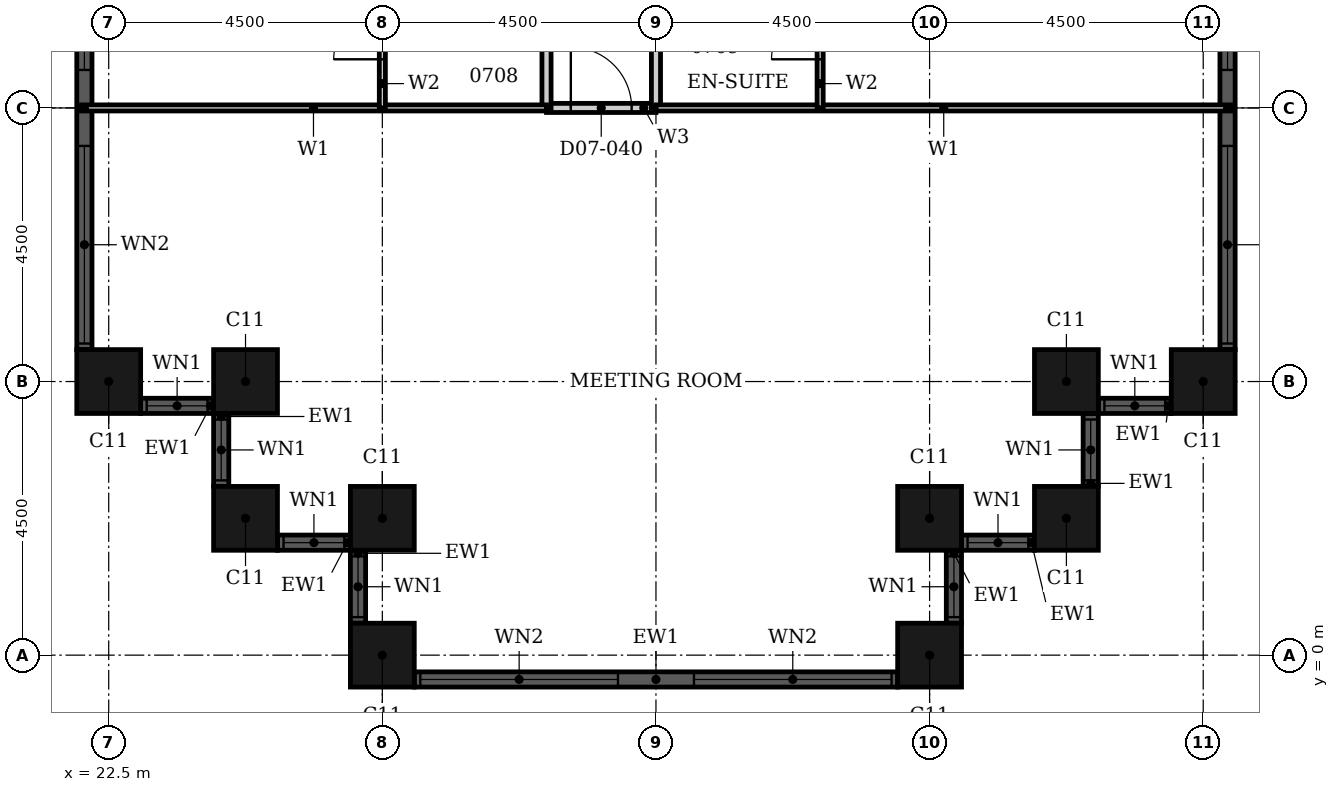
"""IFC4 building model, lengths in metres.
Left out: names, types, materials, properties, quantities, classifications, styles, units other than length and angle.
Written with IfcOpenShell. Run it as: python <this file> out.ifc"""

import sys

from ifc_helpers import new_model, si_unit, direction, frame, frame_2d, origin, origin_2d, place, context, subcontext, project, spatial, rectangle, hollow_rectangle, extrude, element, fill, save


model = new_model("IFC4")
c1 = context("Model", 3, precision=1e-05, world=origin(), true_north=direction((0.0, 1.0)))
c2 = subcontext(c1, "Body", "Model", "MODEL_VIEW")
j1 = project(units=[si_unit("LENGTHUNIT", "METRE"), si_unit("PLANEANGLEUNIT", "RADIAN")], contexts=[c1])
p1 = place(None, origin())
s1 = spatial("IfcSite", under=j1, at=p1, CompositionType="ELEMENT")
p2 = place(p1, origin())
s2 = spatial("IfcBuilding", under=s1, at=p2, CompositionType="ELEMENT")
p3 = place(p2, frame((0.0, 0.0, 37.2)))
s3 = spatial("IfcBuildingStorey", under=s2, at=p3, CompositionType="ELEMENT", Elevation=37.2)
for number, where, z_axis, x_axis in (
    (1, (22.5, 4.5, 0.0), (0.0, 0.0, 1.0), (1.0, 0.0, 0.0)),
    (2, (24.75, 4.5, 0.0), (0.0, 0.0, 1.0), (1.0, 0.0, 0.0)),
    (3, (24.75, 2.25, 0.0), (0.0, 0.0, 1.0), (1.0, 0.0, 0.0)),
    (4, (27.0, 2.25, 0.0), (0.0, 0.0, 1.0), (1.0, 0.0, 0.0)),
    (5, (27.0, 0.0, 0.0), (0.0, 0.0, 1.0), (1.0, 0.0, 0.0)),
    (6, (36.0, 0.0, 0.0), (0.0, 0.0, 1.0), (1.0, 0.0, 0.0)),
    (7, (36.0, 2.25, 0.0), (0.0, 0.0, 1.0), (1.0, 0.0, 0.0)),
    (8, (38.25, 2.25, 0.0), (0.0, 0.0, 1.0), (1.0, 0.0, 0.0)),
    (9, (38.25, 4.5, 0.0), (0.0, 0.0, 1.0), (1.0, 0.0, 0.0)),
    (10, (40.5, 4.5, 0.0), (0.0, 0.0, 1.0), (1.0, 0.0, 0.0)),
):
    element("IfcColumn", number, at=place(p3, frame(where, z_axis=z_axis, x_axis=x_axis)), inside=s3, PredefinedType="COLUMN", context=c2, shape_type="SweptSolid", body=[
        extrude(hollow_rectangle(XDim=1.05, YDim=1.05, WallThickness=0.034, at=origin_2d()), origin(), (0.0, 0.0, 1.0), 3.6),
    ])
p4 = place(p3, frame((23.025, 4.1, 0.0), z_axis=(0.0, 0.0, 1.0), x_axis=(1.0, 0.0, 0.0)))
e11 = element("IfcWall", 11, at=p4, inside=s3, PredefinedType="SOLIDWALL", context=c2, shape_type="SweptSolid", body=[
    extrude(rectangle(XDim=1.2, YDim=0.25, at=frame_2d((0.6, 0.0))), origin(), (0.0, 0.0, 1.0), 3.6),
])
p5 = place(p4, frame((0.1, 0.0, 0.9)))
e12 = element("IfcOpeningElement", 12, at=p5, cuts=e11, PredefinedType="OPENING", context=c2, shape_type="SweptSolid", body=[
    extrude(rectangle(XDim=1.0, YDim=2.08, at=frame_2d((0.5, 1.04))), frame((0.0, 0.135, 0.0), z_axis=(0.0, -1.0, 0.0), x_axis=(1.0, 0.0, 0.0)), (0.0, 0.0, 1.0), 0.27),
])
p6 = place(p3, frame((24.35, 3.975, 0.0), z_axis=(0.0, 0.0, 1.0), x_axis=(0.0, -1.0, 0.0)))
e13 = element("IfcWall", 13, at=p6, inside=s3, PredefinedType="SOLIDWALL", context=c2, shape_type="SweptSolid", body=[
    extrude(rectangle(XDim=1.2, YDim=0.25, at=frame_2d((0.6, 0.0))), origin(), (0.0, 0.0, 1.0), 3.6),
])
p7 = place(p6, frame((0.1, 0.0, 0.9)))
e14 = element("IfcOpeningElement", 14, at=p7, cuts=e13, PredefinedType="OPENING", context=c2, shape_type="SweptSolid", body=[
    extrude(rectangle(XDim=1.0, YDim=2.08, at=frame_2d((0.5, 1.04))), frame((0.0, 0.135, 0.0), z_axis=(0.0, -1.0, 0.0), x_axis=(1.0, 0.0, 0.0)), (0.0, 0.0, 1.0), 0.27),
])
p8 = place(p3, frame((25.275, 1.85, 0.0), z_axis=(0.0, 0.0, 1.0), x_axis=(1.0, 0.0, 0.0)))
e15 = element("IfcWall", 15, at=p8, inside=s3, PredefinedType="SOLIDWALL", context=c2, shape_type="SweptSolid", body=[
    extrude(rectangle(XDim=1.2, YDim=0.25, at=frame_2d((0.6, 0.0))), origin(), (0.0, 0.0, 1.0), 3.6),
])
p9 = place(p8, frame((0.1, 0.0, 0.9)))
e16 = element("IfcOpeningElement", 16, at=p9, cuts=e15, PredefinedType="OPENING", context=c2, shape_type="SweptSolid", body=[
    extrude(rectangle(XDim=1.0, YDim=2.08, at=frame_2d((0.5, 1.04))), frame((0.0, 0.135, 0.0), z_axis=(0.0, -1.0, 0.0), x_axis=(1.0, 0.0, 0.0)), (0.0, 0.0, 1.0), 0.27),
])
p10 = place(p3, frame((26.6, 1.725, 0.0), z_axis=(0.0, 0.0, 1.0), x_axis=(0.0, -1.0, 0.0)))
e17 = element("IfcWall", 17, at=p10, inside=s3, PredefinedType="SOLIDWALL", context=c2, shape_type="SweptSolid", body=[
    extrude(rectangle(XDim=1.2, YDim=0.25, at=frame_2d((0.6, 0.0))), origin(), (0.0, 0.0, 1.0), 3.6),
])
p11 = place(p10, frame((0.1, 0.0, 0.9)))
e18 = element("IfcOpeningElement", 18, at=p11, cuts=e17, PredefinedType="OPENING", context=c2, shape_type="SweptSolid", body=[
    extrude(rectangle(XDim=1.0, YDim=2.08, at=frame_2d((0.5, 1.04))), frame((0.0, 0.135, 0.0), z_axis=(0.0, -1.0, 0.0), x_axis=(1.0, 0.0, 0.0)), (0.0, 0.0, 1.0), 0.27),
])
p12 = place(p3, frame((27.525, -0.4, 0.0), z_axis=(0.0, 0.0, 1.0), x_axis=(1.0, 0.0, 0.0)))
e19 = element("IfcWall", 19, at=p12, inside=s3, PredefinedType="SOLIDWALL", context=c2, shape_type="SweptSolid", body=[
    extrude(rectangle(XDim=7.95, YDim=0.25, at=frame_2d((3.975, 0.0))), origin(), (0.0, 0.0, 1.0), 3.6),
])
p13 = place(p12, frame((0.1, 0.0, 0.9)))
e20 = element("IfcOpeningElement", 20, at=p13, cuts=e19, PredefinedType="OPENING", context=c2, shape_type="SweptSolid", body=[
    extrude(rectangle(XDim=3.25, YDim=2.08, at=frame_2d((1.625, 1.04))), frame((0.0, 0.135, 0.0), z_axis=(0.0, -1.0, 0.0), x_axis=(1.0, 0.0, 0.0)), (0.0, 0.0, 1.0), 0.27),
])
p14 = place(p12, frame((4.6, 0.0, 0.9)))
e21 = element("IfcOpeningElement", 21, at=p14, cuts=e19, PredefinedType="OPENING", context=c2, shape_type="SweptSolid", body=[
    extrude(rectangle(XDim=3.25, YDim=2.08, at=frame_2d((1.625, 1.04))), frame((0.0, 0.135, 0.0), z_axis=(0.0, -1.0, 0.0), x_axis=(1.0, 0.0, 0.0)), (0.0, 0.0, 1.0), 0.27),
])
p15 = place(p3, frame((36.4, 0.525, 0.0), z_axis=(0.0, 0.0, 1.0), x_axis=(0.0, 1.0, 0.0)))
e22 = element("IfcWall", 22, at=p15, inside=s3, PredefinedType="SOLIDWALL", context=c2, shape_type="SweptSolid", body=[
    extrude(rectangle(XDim=1.2, YDim=0.25, at=frame_2d((0.6, 0.0))), origin(), (0.0, 0.0, 1.0), 3.6),
])
p16 = place(p15, frame((0.1, 0.0, 0.9)))
e23 = element("IfcOpeningElement", 23, at=p16, cuts=e22, PredefinedType="OPENING", context=c2, shape_type="SweptSolid", body=[
    extrude(rectangle(XDim=1.0, YDim=2.08, at=frame_2d((0.5, 1.04))), frame((0.0, 0.135, 0.0), z_axis=(0.0, -1.0, 0.0), x_axis=(1.0, 0.0, 0.0)), (0.0, 0.0, 1.0), 0.27),
])
p17 = place(p3, frame((36.525, 1.85, 0.0), z_axis=(0.0, 0.0, 1.0), x_axis=(1.0, 0.0, 0.0)))
e24 = element("IfcWall", 24, at=p17, inside=s3, PredefinedType="SOLIDWALL", context=c2, shape_type="SweptSolid", body=[
    extrude(rectangle(XDim=1.2, YDim=0.25, at=frame_2d((0.6, 0.0))), origin(), (0.0, 0.0, 1.0), 3.6),
])
p18 = place(p17, frame((0.1, 0.0, 0.9)))
e25 = element("IfcOpeningElement", 25, at=p18, cuts=e24, PredefinedType="OPENING", context=c2, shape_type="SweptSolid", body=[
    extrude(rectangle(XDim=1.0, YDim=2.08, at=frame_2d((0.5, 1.04))), frame((0.0, 0.135, 0.0), z_axis=(0.0, -1.0, 0.0), x_axis=(1.0, 0.0, 0.0)), (0.0, 0.0, 1.0), 0.27),
])
p19 = place(p3, frame((38.65, 2.775, 0.0), z_axis=(0.0, 0.0, 1.0), x_axis=(0.0, 1.0, 0.0)))
e26 = element("IfcWall", 26, at=p19, inside=s3, PredefinedType="SOLIDWALL", context=c2, shape_type="SweptSolid", body=[
    extrude(rectangle(XDim=1.2, YDim=0.25, at=frame_2d((0.6, 0.0))), origin(), (0.0, 0.0, 1.0), 3.6),
])
p20 = place(p19, frame((0.1, 0.0, 0.9)))
e27 = element("IfcOpeningElement", 27, at=p20, cuts=e26, PredefinedType="OPENING", context=c2, shape_type="SweptSolid", body=[
    extrude(rectangle(XDim=1.0, YDim=2.08, at=frame_2d((0.5, 1.04))), frame((0.0, 0.135, 0.0), z_axis=(0.0, -1.0, 0.0), x_axis=(1.0, 0.0, 0.0)), (0.0, 0.0, 1.0), 0.27),
])
p21 = place(p3, frame((38.775, 4.1, 0.0), z_axis=(0.0, 0.0, 1.0), x_axis=(1.0, 0.0, 0.0)))
e28 = element("IfcWall", 28, at=p21, inside=s3, PredefinedType="SOLIDWALL", context=c2, shape_type="SweptSolid", body=[
    extrude(rectangle(XDim=1.2, YDim=0.25, at=frame_2d((0.6, 0.0))), origin(), (0.0, 0.0, 1.0), 3.6),
])
p22 = place(p21, frame((0.1, 0.0, 0.9)))
e29 = element("IfcOpeningElement", 29, at=p22, cuts=e28, PredefinedType="OPENING", context=c2, shape_type="SweptSolid", body=[
    extrude(rectangle(XDim=1.0, YDim=2.08, at=frame_2d((0.5, 1.04))), frame((0.0, 0.135, 0.0), z_axis=(0.0, -1.0, 0.0), x_axis=(1.0, 0.0, 0.0)), (0.0, 0.0, 1.0), 0.27),
])
p23 = place(p3, frame((40.9, 5.025, 0.0), z_axis=(0.0, 0.0, 1.0), x_axis=(0.0, 1.0, 0.0)))
e30 = element("IfcWall", 30, at=p23, inside=s3, PredefinedType="SOLIDWALL", context=c2, shape_type="SweptSolid", body=[
    extrude(rectangle(XDim=7.95, YDim=0.25, at=frame_2d((3.975, 0.0))), origin(), (0.0, 0.0, 1.0), 3.6),
])
p24 = place(p23, frame((0.1, 0.0, 0.9)))
e31 = element("IfcOpeningElement", 31, at=p24, cuts=e30, PredefinedType="OPENING", context=c2, shape_type="SweptSolid", body=[
    extrude(rectangle(XDim=3.25, YDim=2.08, at=frame_2d((1.625, 1.04))), frame((0.0, 0.135, 0.0), z_axis=(0.0, -1.0, 0.0), x_axis=(1.0, 0.0, 0.0)), (0.0, 0.0, 1.0), 0.27),
])
p25 = place(p23, frame((4.6, 0.0, 0.9)))
e32 = element("IfcOpeningElement", 32, at=p25, cuts=e30, PredefinedType="OPENING", context=c2, shape_type="SweptSolid", body=[
    extrude(rectangle(XDim=3.25, YDim=2.08, at=frame_2d((1.625, 1.04))), frame((0.0, 0.135, 0.0), z_axis=(0.0, -1.0, 0.0), x_axis=(1.0, 0.0, 0.0)), (0.0, 0.0, 1.0), 0.27),
])
p26 = place(p3, frame((22.1, 12.975, 0.0), z_axis=(0.0, 0.0, 1.0), x_axis=(0.0, -1.0, 0.0)))
e33 = element("IfcWall", 33, at=p26, inside=s3, PredefinedType="SOLIDWALL", context=c2, shape_type="SweptSolid", body=[
    extrude(rectangle(XDim=7.95, YDim=0.25, at=frame_2d((3.975, 0.0))), origin(), (0.0, 0.0, 1.0), 3.6),
])
p27 = place(p26, frame((0.1, 0.0, 0.9)))
e34 = element("IfcOpeningElement", 34, at=p27, cuts=e33, PredefinedType="OPENING", context=c2, shape_type="SweptSolid", body=[
    extrude(rectangle(XDim=3.25, YDim=2.08, at=frame_2d((1.625, 1.04))), frame((0.0, 0.135, 0.0), z_axis=(0.0, -1.0, 0.0), x_axis=(1.0, 0.0, 0.0)), (0.0, 0.0, 1.0), 0.27),
])
p28 = place(p26, frame((4.6, 0.0, 0.9)))
e35 = element("IfcOpeningElement", 35, at=p28, cuts=e33, PredefinedType="OPENING", context=c2, shape_type="SweptSolid", body=[
    extrude(rectangle(XDim=3.25, YDim=2.08, at=frame_2d((1.625, 1.04))), frame((0.0, 0.135, 0.0), z_axis=(0.0, -1.0, 0.0), x_axis=(1.0, 0.0, 0.0)), (0.0, 0.0, 1.0), 0.27),
])
p29 = place(p3, frame((29.7, 9.0, 0.0), z_axis=(0.0, 0.0, 1.0), x_axis=(1.0, 0.0, 0.0)))
e36 = element("IfcWall", 36, at=p29, inside=s3, PredefinedType="PARTITIONING", context=c2, shape_type="SweptSolid", body=[
    extrude(rectangle(XDim=1.8, YDim=0.15, at=frame_2d((0.9, 0.0))), origin(), (0.0, 0.0, 1.0), 3.3),
])
p30 = place(p29, frame((0.4, 0.0, 0.0)))
e37 = element("IfcOpeningElement", 37, at=p30, cuts=e36, PredefinedType="OPENING", context=c2, shape_type="SweptSolid", body=[
    extrude(rectangle(XDim=1.0, YDim=2.1, at=frame_2d((0.5, 1.05))), frame((0.0, 0.085, 0.0), z_axis=(0.0, -1.0, 0.0), x_axis=(1.0, 0.0, 0.0)), (0.0, 0.0, 1.0), 0.17),
])
p31 = place(p3, frame((29.7, 9.0, 0.0), z_axis=(0.0, 0.0, 1.0), x_axis=(0.0, 1.0, 0.0)))
e38 = element("IfcWall", 38, at=p31, inside=s3, PredefinedType="PARTITIONING", context=c2, shape_type="SweptSolid", body=[
    extrude(rectangle(XDim=4.5, YDim=0.15, at=frame_2d((2.25, 0.0))), origin(), (0.0, 0.0, 1.0), 3.3),
])
p32 = place(p31, frame((2.95, 0.0, 0.0)))
e39 = element("IfcOpeningElement", 39, at=p32, cuts=e38, PredefinedType="OPENING", context=c2, shape_type="SweptSolid", body=[
    extrude(rectangle(XDim=1.0, YDim=2.1, at=frame_2d((0.5, 1.05))), frame((0.0, 0.085, 0.0), z_axis=(0.0, -1.0, 0.0), x_axis=(1.0, 0.0, 0.0)), (0.0, 0.0, 1.0), 0.17),
])
p33 = place(p3, frame((31.5, 9.0, 0.0), z_axis=(0.0, 0.0, 1.0), x_axis=(0.0, 1.0, 0.0)))
e40 = element("IfcWall", 40, at=p33, inside=s3, PredefinedType="PARTITIONING", context=c2, shape_type="SweptSolid", body=[
    extrude(rectangle(XDim=11.7, YDim=0.15, at=frame_2d((5.85, 0.0))), origin(), (0.0, 0.0, 1.0), 2.58),
])
p34 = place(p33, frame((2.95, 0.0, 0.0)))
e41 = element("IfcOpeningElement", 41, at=p34, cuts=e40, PredefinedType="OPENING", context=c2, shape_type="SweptSolid", body=[
    extrude(rectangle(XDim=1.0, YDim=2.1, at=frame_2d((0.5, 1.05))), frame((0.0, 0.085, 0.0), z_axis=(0.0, -1.0, 0.0), x_axis=(1.0, 0.0, 0.0)), (0.0, 0.0, 1.0), 0.17),
])
p35 = place(p3, frame((31.5, 9.0, 0.0), z_axis=(0.0, 0.0, 1.0), x_axis=(1.0, 0.0, 0.0)))
e42 = element("IfcWall", 42, at=p35, inside=s3, PredefinedType="PARTITIONING", context=c2, shape_type="SweptSolid", body=[
    extrude(rectangle(XDim=9.465, YDim=0.1, at=frame_2d((4.732, 0.0))), origin(), (0.0, 0.0, 1.0), 3.3),
])
p36 = place(p3, frame((22.035, 9.0, 0.0), z_axis=(0.0, 0.0, 1.0), x_axis=(1.0, 0.0, 0.0)))
e43 = element("IfcWall", 43, at=p36, inside=s3, PredefinedType="PARTITIONING", context=c2, shape_type="SweptSolid", body=[
    extrude(rectangle(XDim=7.665, YDim=0.1, at=frame_2d((3.833, 0.0))), origin(), (0.0, 0.0, 1.0), 3.3),
])
p37 = place(p3, frame((27.0, 9.0, 0.0), z_axis=(0.0, 0.0, 1.0), x_axis=(0.0, 1.0, 0.0)))
e44 = element("IfcWall", 44, at=p37, inside=s3, PredefinedType="PARTITIONING", context=c2, shape_type="SweptSolid", body=[
    extrude(rectangle(XDim=2.4, YDim=0.1, at=frame_2d((1.2, 0.0))), origin(), (0.0, 0.0, 1.0), 2.58),
])
p38 = place(p37, frame((0.8, 0.0, 0.0)))
e45 = element("IfcOpeningElement", 45, at=p38, cuts=e44, PredefinedType="OPENING", context=c2, shape_type="SweptSolid", body=[
    extrude(rectangle(XDim=0.8, YDim=2.1, at=frame_2d((0.4, 1.05))), frame((0.0, 0.06, 0.0), z_axis=(0.0, -1.0, 0.0), x_axis=(1.0, 0.0, 0.0)), (0.0, 0.0, 1.0), 0.12),
])
p39 = place(p3, frame((34.2, 9.0, 0.0), z_axis=(0.0, 0.0, 1.0), x_axis=(0.0, 1.0, 0.0)))
e46 = element("IfcWall", 46, at=p39, inside=s3, PredefinedType="PARTITIONING", context=c2, shape_type="SweptSolid", body=[
    extrude(rectangle(XDim=2.4, YDim=0.1, at=frame_2d((1.2, 0.0))), origin(), (0.0, 0.0, 1.0), 3.3),
])
p40 = place(p39, frame((0.8, 0.0, 0.0)))
e47 = element("IfcOpeningElement", 47, at=p40, cuts=e46, PredefinedType="OPENING", context=c2, shape_type="SweptSolid", body=[
    extrude(rectangle(XDim=0.8, YDim=2.1, at=frame_2d((0.4, 1.05))), frame((0.0, 0.06, 0.0), z_axis=(0.0, -1.0, 0.0), x_axis=(1.0, 0.0, 0.0)), (0.0, 0.0, 1.0), 0.12),
])
p41 = place(p5, origin())
e48 = element("IfcWindow", 48, at=p41, inside=s3, PartitioningType="SINGLE_PANEL", PredefinedType="WINDOW", context=c2, shape_type="SweptSolid", body=[
    extrude(rectangle(XDim=1.0, YDim=2.08, at=frame_2d((0.5, 1.04))), frame((0.0, 0.03, 0.0), z_axis=(0.0, -1.0, 0.0), x_axis=(1.0, 0.0, 0.0)), (0.0, 0.0, 1.0), 0.06),
])
fill(e12, e48)
p42 = place(p7, origin())
e49 = element("IfcWindow", 49, at=p42, inside=s3, PartitioningType="SINGLE_PANEL", PredefinedType="WINDOW", context=c2, shape_type="SweptSolid", body=[
    extrude(rectangle(XDim=1.0, YDim=2.08, at=frame_2d((0.5, 1.04))), frame((0.0, 0.03, 0.0), z_axis=(0.0, -1.0, 0.0), x_axis=(1.0, 0.0, 0.0)), (0.0, 0.0, 1.0), 0.06),
])
fill(e14, e49)
p43 = place(p9, origin())
e50 = element("IfcWindow", 50, at=p43, inside=s3, PartitioningType="SINGLE_PANEL", PredefinedType="WINDOW", context=c2, shape_type="SweptSolid", body=[
    extrude(rectangle(XDim=1.0, YDim=2.08, at=frame_2d((0.5, 1.04))), frame((0.0, 0.03, 0.0), z_axis=(0.0, -1.0, 0.0), x_axis=(1.0, 0.0, 0.0)), (0.0, 0.0, 1.0), 0.06),
])
fill(e16, e50)
p44 = place(p11, origin())
e51 = element("IfcWindow", 51, at=p44, inside=s3, PartitioningType="SINGLE_PANEL", PredefinedType="WINDOW", context=c2, shape_type="SweptSolid", body=[
    extrude(rectangle(XDim=1.0, YDim=2.08, at=frame_2d((0.5, 1.04))), frame((0.0, 0.03, 0.0), z_axis=(0.0, -1.0, 0.0), x_axis=(1.0, 0.0, 0.0)), (0.0, 0.0, 1.0), 0.06),
])
fill(e18, e51)
p45 = place(p13, origin())
e52 = element("IfcWindow", 52, at=p45, inside=s3, PartitioningType="SINGLE_PANEL", PredefinedType="WINDOW", context=c2, shape_type="SweptSolid", body=[
    extrude(rectangle(XDim=3.25, YDim=2.08, at=frame_2d((1.625, 1.04))), frame((0.0, 0.03, 0.0), z_axis=(0.0, -1.0, 0.0), x_axis=(1.0, 0.0, 0.0)), (0.0, 0.0, 1.0), 0.06),
])
fill(e20, e52)
p46 = place(p14, origin())
e53 = element("IfcWindow", 53, at=p46, inside=s3, PartitioningType="SINGLE_PANEL", PredefinedType="WINDOW", context=c2, shape_type="SweptSolid", body=[
    extrude(rectangle(XDim=3.25, YDim=2.08, at=frame_2d((1.625, 1.04))), frame((0.0, 0.03, 0.0), z_axis=(0.0, -1.0, 0.0), x_axis=(1.0, 0.0, 0.0)), (0.0, 0.0, 1.0), 0.06),
])
fill(e21, e53)
p47 = place(p16, origin())
e54 = element("IfcWindow", 54, at=p47, inside=s3, PartitioningType="SINGLE_PANEL", PredefinedType="WINDOW", context=c2, shape_type="SweptSolid", body=[
    extrude(rectangle(XDim=1.0, YDim=2.08, at=frame_2d((0.5, 1.04))), frame((0.0, 0.03, 0.0), z_axis=(0.0, -1.0, 0.0), x_axis=(1.0, 0.0, 0.0)), (0.0, 0.0, 1.0), 0.06),
])
fill(e23, e54)
p48 = place(p18, origin())
e55 = element("IfcWindow", 55, at=p48, inside=s3, PartitioningType="SINGLE_PANEL", PredefinedType="WINDOW", context=c2, shape_type="SweptSolid", body=[
    extrude(rectangle(XDim=1.0, YDim=2.08, at=frame_2d((0.5, 1.04))), frame((0.0, 0.03, 0.0), z_axis=(0.0, -1.0, 0.0), x_axis=(1.0, 0.0, 0.0)), (0.0, 0.0, 1.0), 0.06),
])
fill(e25, e55)
p49 = place(p20, origin())
e56 = element("IfcWindow", 56, at=p49, inside=s3, PartitioningType="SINGLE_PANEL", PredefinedType="WINDOW", context=c2, shape_type="SweptSolid", body=[
    extrude(rectangle(XDim=1.0, YDim=2.08, at=frame_2d((0.5, 1.04))), frame((0.0, 0.03, 0.0), z_axis=(0.0, -1.0, 0.0), x_axis=(1.0, 0.0, 0.0)), (0.0, 0.0, 1.0), 0.06),
])
fill(e27, e56)
p50 = place(p22, origin())
e57 = element("IfcWindow", 57, at=p50, inside=s3, PartitioningType="SINGLE_PANEL", PredefinedType="WINDOW", context=c2, shape_type="SweptSolid", body=[
    extrude(rectangle(XDim=1.0, YDim=2.08, at=frame_2d((0.5, 1.04))), frame((0.0, 0.03, 0.0), z_axis=(0.0, -1.0, 0.0), x_axis=(1.0, 0.0, 0.0)), (0.0, 0.0, 1.0), 0.06),
])
fill(e29, e57)
p51 = place(p24, origin())
e58 = element("IfcWindow", 58, at=p51, inside=s3, PartitioningType="SINGLE_PANEL", PredefinedType="WINDOW", context=c2, shape_type="SweptSolid", body=[
    extrude(rectangle(XDim=3.25, YDim=2.08, at=frame_2d((1.625, 1.04))), frame((0.0, 0.03, 0.0), z_axis=(0.0, -1.0, 0.0), x_axis=(1.0, 0.0, 0.0)), (0.0, 0.0, 1.0), 0.06),
])
fill(e31, e58)
p52 = place(p25, origin())
e59 = element("IfcWindow", 59, at=p52, inside=s3, PartitioningType="SINGLE_PANEL", PredefinedType="WINDOW", context=c2, shape_type="SweptSolid", body=[
    extrude(rectangle(XDim=3.25, YDim=2.08, at=frame_2d((1.625, 1.04))), frame((0.0, 0.03, 0.0), z_axis=(0.0, -1.0, 0.0), x_axis=(1.0, 0.0, 0.0)), (0.0, 0.0, 1.0), 0.06),
])
fill(e32, e59)
p53 = place(p27, origin())
e60 = element("IfcWindow", 60, at=p53, inside=s3, PartitioningType="SINGLE_PANEL", PredefinedType="WINDOW", context=c2, shape_type="SweptSolid", body=[
    extrude(rectangle(XDim=3.25, YDim=2.08, at=frame_2d((1.625, 1.04))), frame((0.0, 0.03, 0.0), z_axis=(0.0, -1.0, 0.0), x_axis=(1.0, 0.0, 0.0)), (0.0, 0.0, 1.0), 0.06),
])
fill(e34, e60)
p54 = place(p28, origin())
e61 = element("IfcWindow", 61, at=p54, inside=s3, PartitioningType="SINGLE_PANEL", PredefinedType="WINDOW", context=c2, shape_type="SweptSolid", body=[
    extrude(rectangle(XDim=3.25, YDim=2.08, at=frame_2d((1.625, 1.04))), frame((0.0, 0.03, 0.0), z_axis=(0.0, -1.0, 0.0), x_axis=(1.0, 0.0, 0.0)), (0.0, 0.0, 1.0), 0.06),
])
fill(e35, e61)
p55 = place(p38, origin())
e62 = element("IfcDoor", 62, at=p55, inside=s3, OperationType="SINGLE_SWING_RIGHT", PredefinedType="DOOR", context=c2, shape_type="SweptSolid", body=[
    extrude(rectangle(XDim=0.8, YDim=2.1, at=frame_2d((0.4, 1.05))), frame((0.0, 0.025, 0.0), z_axis=(0.0, -1.0, 0.0), x_axis=(1.0, 0.0, 0.0)), (0.0, 0.0, 1.0), 0.05),
])
fill(e45, e62)
p56 = place(p40, origin())
e63 = element("IfcDoor", 63, at=p56, inside=s3, OperationType="SINGLE_SWING_RIGHT", PredefinedType="DOOR", context=c2, shape_type="SweptSolid", body=[
    extrude(rectangle(XDim=0.8, YDim=2.1, at=frame_2d((0.4, 1.05))), frame((0.0, 0.025, 0.0), z_axis=(0.0, -1.0, 0.0), x_axis=(1.0, 0.0, 0.0)), (0.0, 0.0, 1.0), 0.05),
])
fill(e47, e63)
p57 = place(p30, origin())
e64 = element("IfcDoor", 64, at=p57, inside=s3, OperationType="SINGLE_SWING_LEFT", PredefinedType="DOOR", context=c2, shape_type="SweptSolid", body=[
    extrude(rectangle(XDim=1.0, YDim=2.1, at=frame_2d((0.5, 1.05))), frame((0.0, 0.025, 0.0), z_axis=(0.0, -1.0, 0.0), x_axis=(1.0, 0.0, 0.0)), (0.0, 0.0, 1.0), 0.05),
])
fill(e37, e64)
save(model, sys.argv[1])
